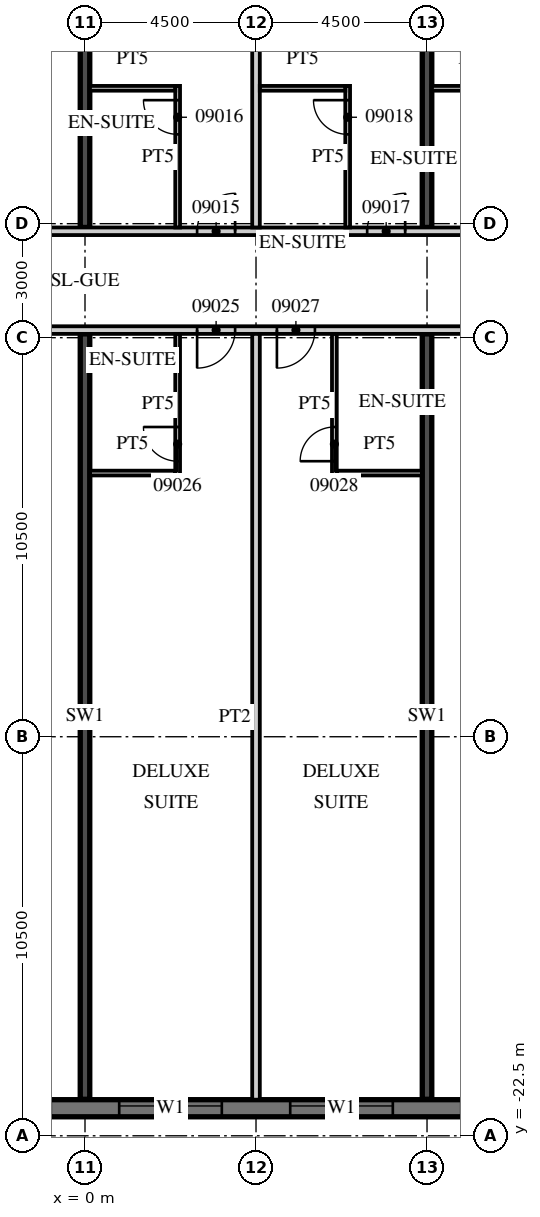
"""IFC4 building model, lengths in metres.
Left out: names, types, materials, properties, quantities, classifications, styles, units other than length and angle.
Written with IfcOpenShell. Run it as: python <this file> out.ifc"""

import sys

from ifc_helpers import new_model, si_unit, direction, frame, frame_2d, origin, place, context, subcontext, project, spatial, rectangle, extrude, element, fill, save


model = new_model("IFC4")
c1 = context("Model", 3, precision=1e-05, world=origin(), true_north=direction((0.0, 1.0)))
c2 = subcontext(c1, "Body", "Model", "MODEL_VIEW")
j1 = project(units=[si_unit("LENGTHUNIT", "METRE"), si_unit("PLANEANGLEUNIT", "RADIAN")], contexts=[c1])
p1 = place(None, origin())
s1 = spatial("IfcSite", under=j1, at=p1, CompositionType="ELEMENT")
p2 = place(p1, origin())
s2 = spatial("IfcBuilding", under=s1, at=p2, CompositionType="ELEMENT")
p3 = place(p2, frame((0.0, 0.0, 60.0)))
s3 = spatial("IfcBuildingStorey", under=s2, at=p3, CompositionType="ELEMENT", Elevation=60.0)
for number, where, z_axis, x_axis in (
    (1, (0.0, -21.54, 0.0), (0.0, 0.0, 1.0), (0.0, 1.0, 0.0)),
    (2, (0.0, 1.4, 0.0), (0.0, 0.0, 1.0), (0.0, 1.0, 0.0)),
    (3, (9.0, -21.54, 0.0), (0.0, 0.0, 1.0), (0.0, 1.0, 0.0)),
    (4, (9.0, 1.4, 0.0), (0.0, 0.0, 1.0), (0.0, 1.0, 0.0)),
):
    element("IfcWall", number, at=place(p3, frame(where, z_axis=z_axis, x_axis=x_axis)), inside=s3, PredefinedType="SHEAR", context=c2, shape_type="SweptSolid", body=[
        extrude(rectangle(XDim=20.14, YDim=0.25, at=frame_2d((10.07, 0.0))), origin(), (0.0, 0.0, 1.0), 3.3),
    ])
p4 = place(p3, frame((-13.5, -21.775, 0.0), z_axis=(0.0, 0.0, 1.0), x_axis=(1.0, 0.0, 0.0)))
e5 = element("IfcWall", 5, at=p4, inside=s3, PredefinedType="SOLIDWALL", context=c2, shape_type="SweptSolid", body=[
    extrude(rectangle(XDim=54.5, YDim=0.45, at=frame_2d((27.25, 0.0))), origin(), (0.0, 0.0, 1.0), 3.02),
])
p5 = place(p4, frame((0.9, 0.0, 0.45)))
e6 = element("IfcOpeningElement", 6, at=p5, cuts=e5, PredefinedType="OPENING", context=c2, shape_type="SweptSolid", body=[
    extrude(rectangle(XDim=2.7, YDim=2.25, at=frame_2d((1.35, 1.125))), frame((0.0, 0.235, 0.0), z_axis=(0.0, -1.0, 0.0), x_axis=(1.0, 0.0, 0.0)), (0.0, 0.0, 1.0), 0.47),
])
p6 = place(p4, frame((5.4, 0.0, 0.45)))
e7 = element("IfcOpeningElement", 7, at=p6, cuts=e5, PredefinedType="OPENING", context=c2, shape_type="SweptSolid", body=[
    extrude(rectangle(XDim=2.7, YDim=2.25, at=frame_2d((1.35, 1.125))), frame((0.0, 0.235, 0.0), z_axis=(0.0, -1.0, 0.0), x_axis=(1.0, 0.0, 0.0)), (0.0, 0.0, 1.0), 0.47),
])
p7 = place(p4, frame((9.9, 0.0, 0.45)))
e8 = element("IfcOpeningElement", 8, at=p7, cuts=e5, PredefinedType="OPENING", context=c2, shape_type="SweptSolid", body=[
    extrude(rectangle(XDim=2.7, YDim=2.25, at=frame_2d((1.35, 1.125))), frame((0.0, 0.235, 0.0), z_axis=(0.0, -1.0, 0.0), x_axis=(1.0, 0.0, 0.0)), (0.0, 0.0, 1.0), 0.47),
])
p8 = place(p4, frame((14.4, 0.0, 0.45)))
e9 = element("IfcOpeningElement", 9, at=p8, cuts=e5, PredefinedType="OPENING", context=c2, shape_type="SweptSolid", body=[
    extrude(rectangle(XDim=2.7, YDim=2.25, at=frame_2d((1.35, 1.125))), frame((0.0, 0.235, 0.0), z_axis=(0.0, -1.0, 0.0), x_axis=(1.0, 0.0, 0.0)), (0.0, 0.0, 1.0), 0.47),
])
p9 = place(p4, frame((18.9, 0.0, 0.45)))
e10 = element("IfcOpeningElement", 10, at=p9, cuts=e5, PredefinedType="OPENING", context=c2, shape_type="SweptSolid", body=[
    extrude(rectangle(XDim=2.7, YDim=2.25, at=frame_2d((1.35, 1.125))), frame((0.0, 0.235, 0.0), z_axis=(0.0, -1.0, 0.0), x_axis=(1.0, 0.0, 0.0)), (0.0, 0.0, 1.0), 0.47),
])
p10 = place(p4, frame((23.4, 0.0, 0.45)))
e11 = element("IfcOpeningElement", 11, at=p10, cuts=e5, PredefinedType="OPENING", context=c2, shape_type="SweptSolid", body=[
    extrude(rectangle(XDim=2.7, YDim=2.25, at=frame_2d((1.35, 1.125))), frame((0.0, 0.235, 0.0), z_axis=(0.0, -1.0, 0.0), x_axis=(1.0, 0.0, 0.0)), (0.0, 0.0, 1.0), 0.47),
])
p11 = place(p4, frame((27.9, 0.0, 0.45)))
e12 = element("IfcOpeningElement", 12, at=p11, cuts=e5, PredefinedType="OPENING", context=c2, shape_type="SweptSolid", body=[
    extrude(rectangle(XDim=2.7, YDim=2.25, at=frame_2d((1.35, 1.125))), frame((0.0, 0.235, 0.0), z_axis=(0.0, -1.0, 0.0), x_axis=(1.0, 0.0, 0.0)), (0.0, 0.0, 1.0), 0.47),
])
p12 = place(p4, frame((32.4, 0.0, 0.45)))
e13 = element("IfcOpeningElement", 13, at=p12, cuts=e5, PredefinedType="OPENING", context=c2, shape_type="SweptSolid", body=[
    extrude(rectangle(XDim=2.7, YDim=2.25, at=frame_2d((1.35, 1.125))), frame((0.0, 0.235, 0.0), z_axis=(0.0, -1.0, 0.0), x_axis=(1.0, 0.0, 0.0)), (0.0, 0.0, 1.0), 0.47),
])
p13 = place(p4, frame((36.9, 0.0, 0.45)))
e14 = element("IfcOpeningElement", 14, at=p13, cuts=e5, PredefinedType="OPENING", context=c2, shape_type="SweptSolid", body=[
    extrude(rectangle(XDim=2.7, YDim=2.25, at=frame_2d((1.35, 1.125))), frame((0.0, 0.235, 0.0), z_axis=(0.0, -1.0, 0.0), x_axis=(1.0, 0.0, 0.0)), (0.0, 0.0, 1.0), 0.47),
])
p14 = place(p4, frame((41.4, 0.0, 0.45)))
e15 = element("IfcOpeningElement", 15, at=p14, cuts=e5, PredefinedType="OPENING", context=c2, shape_type="SweptSolid", body=[
    extrude(rectangle(XDim=2.7, YDim=2.25, at=frame_2d((1.35, 1.125))), frame((0.0, 0.235, 0.0), z_axis=(0.0, -1.0, 0.0), x_axis=(1.0, 0.0, 0.0)), (0.0, 0.0, 1.0), 0.47),
])
p15 = place(p4, frame((45.9, 0.0, 0.45)))
e16 = element("IfcOpeningElement", 16, at=p15, cuts=e5, PredefinedType="OPENING", context=c2, shape_type="SweptSolid", body=[
    extrude(rectangle(XDim=2.7, YDim=2.25, at=frame_2d((1.35, 1.125))), frame((0.0, 0.235, 0.0), z_axis=(0.0, -1.0, 0.0), x_axis=(1.0, 0.0, 0.0)), (0.0, 0.0, 1.0), 0.47),
])
p16 = place(p4, frame((50.4, 0.0, 0.45)))
e17 = element("IfcOpeningElement", 17, at=p16, cuts=e5, PredefinedType="OPENING", context=c2, shape_type="SweptSolid", body=[
    extrude(rectangle(XDim=2.7, YDim=2.25, at=frame_2d((1.35, 1.125))), frame((0.0, 0.235, 0.0), z_axis=(0.0, -1.0, 0.0), x_axis=(1.0, 0.0, 0.0)), (0.0, 0.0, 1.0), 0.47),
])
p17 = place(p3, frame((-44.55, 1.3, 0.0), z_axis=(0.0, 0.0, 1.0), x_axis=(1.0, 0.0, 0.0)))
e18 = element("IfcWall", 18, at=p17, inside=s3, PredefinedType="PARTITIONING", context=c2, shape_type="SweptSolid", body=[
    extrude(rectangle(XDim=58.05, YDim=0.2, at=frame_2d((29.025, 0.0))), origin(), (0.0, 0.0, 1.0), 3.02),
])
p18 = place(p17, frame((0.525, 0.0, 0.0)))
e19 = element("IfcOpeningElement", 19, at=p18, cuts=e18, PredefinedType="OPENING", context=c2, shape_type="SweptSolid", body=[
    extrude(rectangle(XDim=1.0, YDim=2.1, at=frame_2d((0.5, 1.05))), frame((0.0, 0.11, 0.0), z_axis=(0.0, -1.0, 0.0), x_axis=(1.0, 0.0, 0.0)), (0.0, 0.0, 1.0), 0.22),
])
p19 = place(p17, frame((6.975, 0.0, 0.0)))
e20 = element("IfcOpeningElement", 20, at=p19, cuts=e18, PredefinedType="OPENING", context=c2, shape_type="SweptSolid", body=[
    extrude(rectangle(XDim=1.0, YDim=2.1, at=frame_2d((0.5, 1.05))), frame((0.0, 0.11, 0.0), z_axis=(0.0, -1.0, 0.0), x_axis=(1.0, 0.0, 0.0)), (0.0, 0.0, 1.0), 0.22),
])
p20 = place(p17, frame((10.987, 0.0, 0.0)))
e21 = element("IfcOpeningElement", 21, at=p20, cuts=e18, PredefinedType="OPENING", context=c2, shape_type="SweptSolid", body=[
    extrude(rectangle(XDim=1.2, YDim=2.1, at=frame_2d((0.6, 1.05))), frame((0.0, 0.11, 0.0), z_axis=(0.0, -1.0, 0.0), x_axis=(1.0, 0.0, 0.0)), (0.0, 0.0, 1.0), 0.22),
])
p21 = place(p17, frame((19.987, 0.0, 0.0)))
e22 = element("IfcOpeningElement", 22, at=p21, cuts=e18, PredefinedType="OPENING", context=c2, shape_type="SweptSolid", body=[
    extrude(rectangle(XDim=1.2, YDim=2.1, at=frame_2d((0.6, 1.05))), frame((0.0, 0.11, 0.0), z_axis=(0.0, -1.0, 0.0), x_axis=(1.0, 0.0, 0.0)), (0.0, 0.0, 1.0), 0.22),
])
p22 = place(p17, frame((29.5, 0.0, 0.0)))
e23 = element("IfcOpeningElement", 23, at=p22, cuts=e18, PredefinedType="OPENING", context=c2, shape_type="SweptSolid", body=[
    extrude(rectangle(XDim=1.0, YDim=2.1, at=frame_2d((0.5, 1.05))), frame((0.0, 0.11, 0.0), z_axis=(0.0, -1.0, 0.0), x_axis=(1.0, 0.0, 0.0)), (0.0, 0.0, 1.0), 0.22),
])
p23 = place(p17, frame((33.975, 0.0, 0.0)))
e24 = element("IfcOpeningElement", 24, at=p23, cuts=e18, PredefinedType="OPENING", context=c2, shape_type="SweptSolid", body=[
    extrude(rectangle(XDim=1.0, YDim=2.1, at=frame_2d((0.5, 1.05))), frame((0.0, 0.11, 0.0), z_axis=(0.0, -1.0, 0.0), x_axis=(1.0, 0.0, 0.0)), (0.0, 0.0, 1.0), 0.22),
])
p24 = place(p17, frame((40.912, 0.0, 0.0)))
e25 = element("IfcOpeningElement", 25, at=p24, cuts=e18, PredefinedType="OPENING", context=c2, shape_type="SweptSolid", body=[
    extrude(rectangle(XDim=1.2, YDim=2.1, at=frame_2d((0.6, 1.05))), frame((0.0, 0.11, 0.0), z_axis=(0.0, -1.0, 0.0), x_axis=(1.0, 0.0, 0.0)), (0.0, 0.0, 1.0), 0.22),
])
p25 = place(p17, frame((47.5, 0.0, 0.0)))
e26 = element("IfcOpeningElement", 26, at=p25, cuts=e18, PredefinedType="OPENING", context=c2, shape_type="SweptSolid", body=[
    extrude(rectangle(XDim=1.0, YDim=2.1, at=frame_2d((0.5, 1.05))), frame((0.0, 0.11, 0.0), z_axis=(0.0, -1.0, 0.0), x_axis=(1.0, 0.0, 0.0)), (0.0, 0.0, 1.0), 0.22),
])
p26 = place(p17, frame((51.975, 0.0, 0.0)))
e27 = element("IfcOpeningElement", 27, at=p26, cuts=e18, PredefinedType="OPENING", context=c2, shape_type="SweptSolid", body=[
    extrude(rectangle(XDim=1.0, YDim=2.1, at=frame_2d((0.5, 1.05))), frame((0.0, 0.11, 0.0), z_axis=(0.0, -1.0, 0.0), x_axis=(1.0, 0.0, 0.0)), (0.0, 0.0, 1.0), 0.22),
])
p27 = place(p17, frame((56.475, 0.0, 0.0)))
e28 = element("IfcOpeningElement", 28, at=p27, cuts=e18, PredefinedType="OPENING", context=c2, shape_type="SweptSolid", body=[
    extrude(rectangle(XDim=1.0, YDim=2.1, at=frame_2d((0.5, 1.05))), frame((0.0, 0.11, 0.0), z_axis=(0.0, -1.0, 0.0), x_axis=(1.0, 0.0, 0.0)), (0.0, 0.0, 1.0), 0.22),
])
p28 = place(p3, frame((4.5, 1.4, 0.0), z_axis=(0.0, 0.0, 1.0), x_axis=(0.0, 1.0, 0.0)))
e29 = element("IfcWall", 29, at=p28, inside=s3, PredefinedType="PARTITIONING", context=c2, shape_type="SweptSolid", body=[
    extrude(rectangle(XDim=20.15, YDim=0.2, at=frame_2d((10.075, 0.0))), origin(), (0.0, 0.0, 1.0), 3.02),
])
p29 = place(p3, frame((2.438, 1.4, 0.0), z_axis=(0.0, 0.0, 1.0), x_axis=(0.0, 1.0, 0.0)))
e30 = element("IfcWall", 30, at=p29, inside=s3, PredefinedType="PARTITIONING", context=c2, shape_type="SweptSolid", body=[
    extrude(rectangle(XDim=3.725, YDim=0.125, at=frame_2d((1.863, 0.0))), origin(), (0.0, 0.0, 1.0), 3.02),
])
p30 = place(p29, frame((2.45, 0.0, 0.0)))
e31 = element("IfcOpeningElement", 31, at=p30, cuts=e30, PredefinedType="OPENING", context=c2, shape_type="SweptSolid", body=[
    extrude(rectangle(XDim=0.9, YDim=2.1, at=frame_2d((0.45, 1.05))), frame((0.0, 0.073, 0.0), z_axis=(0.0, -1.0, 0.0), x_axis=(1.0, 0.0, 0.0)), (0.0, 0.0, 1.0), 0.145),
])
p31 = place(p3, frame((0.125, 5.062, 0.0), z_axis=(0.0, 0.0, 1.0), x_axis=(1.0, 0.0, 0.0)))
e32 = element("IfcWall", 32, at=p31, inside=s3, PredefinedType="PARTITIONING", context=c2, shape_type="SweptSolid", body=[
    extrude(rectangle(XDim=2.25, YDim=0.125, at=frame_2d((1.125, 0.0))), origin(), (0.0, 0.0, 1.0), 3.02),
])
p32 = place(p3, frame((6.912, 1.4, 0.0), z_axis=(0.0, 0.0, 1.0), x_axis=(0.0, 1.0, 0.0)))
e33 = element("IfcWall", 33, at=p32, inside=s3, PredefinedType="PARTITIONING", context=c2, shape_type="SweptSolid", body=[
    extrude(rectangle(XDim=3.725, YDim=0.125, at=frame_2d((1.863, 0.0))), origin(), (0.0, 0.0, 1.0), 3.02),
])
p33 = place(p32, frame((2.45, 0.0, 0.0)))
e34 = element("IfcOpeningElement", 34, at=p33, cuts=e33, PredefinedType="OPENING", context=c2, shape_type="SweptSolid", body=[
    extrude(rectangle(XDim=0.9, YDim=2.1, at=frame_2d((0.45, 1.05))), frame((0.0, 0.073, 0.0), z_axis=(0.0, -1.0, 0.0), x_axis=(1.0, 0.0, 0.0)), (0.0, 0.0, 1.0), 0.145),
])
for number, where, z_axis, x_axis in (
    (35, (4.6, 5.062, 0.0), (0.0, 0.0, 1.0), (1.0, 0.0, 0.0)),
    (36, (9.125, 5.062, 0.0), (0.0, 0.0, 1.0), (1.0, 0.0, 0.0)),
):
    element("IfcWall", number, at=place(p3, frame(where, z_axis=z_axis, x_axis=x_axis)), inside=s3, PredefinedType="PARTITIONING", context=c2, shape_type="SweptSolid", body=[
        extrude(rectangle(XDim=2.25, YDim=0.125, at=frame_2d((1.125, 0.0))), origin(), (0.0, 0.0, 1.0), 3.02),
    ])
p34 = place(p3, frame((-13.5, -1.3, 0.0), z_axis=(0.0, 0.0, 1.0), x_axis=(1.0, 0.0, 0.0)))
e37 = element("IfcWall", 37, at=p34, inside=s3, PredefinedType="PARTITIONING", context=c2, shape_type="SweptSolid", body=[
    extrude(rectangle(XDim=58.05, YDim=0.2, at=frame_2d((29.025, 0.0))), origin(), (0.0, 0.0, 1.0), 3.02),
])
p35 = place(p34, frame((2.925, 0.0, 0.0)))
e38 = element("IfcOpeningElement", 38, at=p35, cuts=e37, PredefinedType="OPENING", context=c2, shape_type="SweptSolid", body=[
    extrude(rectangle(XDim=1.0, YDim=2.1, at=frame_2d((0.5, 1.05))), frame((0.0, 0.11, 0.0), z_axis=(0.0, -1.0, 0.0), x_axis=(1.0, 0.0, 0.0)), (0.0, 0.0, 1.0), 0.22),
])
p36 = place(p34, frame((9.863, 0.0, 0.0)))
e39 = element("IfcOpeningElement", 39, at=p36, cuts=e37, PredefinedType="OPENING", context=c2, shape_type="SweptSolid", body=[
    extrude(rectangle(XDim=1.2, YDim=2.1, at=frame_2d((0.6, 1.05))), frame((0.0, 0.11, 0.0), z_axis=(0.0, -1.0, 0.0), x_axis=(1.0, 0.0, 0.0)), (0.0, 0.0, 1.0), 0.22),
])
p37 = place(p34, frame((16.45, 0.0, 0.0)))
e40 = element("IfcOpeningElement", 40, at=p37, cuts=e37, PredefinedType="OPENING", context=c2, shape_type="SweptSolid", body=[
    extrude(rectangle(XDim=1.0, YDim=2.1, at=frame_2d((0.5, 1.05))), frame((0.0, 0.11, 0.0), z_axis=(0.0, -1.0, 0.0), x_axis=(1.0, 0.0, 0.0)), (0.0, 0.0, 1.0), 0.22),
])
p38 = place(p34, frame((18.55, 0.0, 0.0)))
e41 = element("IfcOpeningElement", 41, at=p38, cuts=e37, PredefinedType="OPENING", context=c2, shape_type="SweptSolid", body=[
    extrude(rectangle(XDim=1.0, YDim=2.1, at=frame_2d((0.5, 1.05))), frame((0.0, 0.11, 0.0), z_axis=(0.0, -1.0, 0.0), x_axis=(1.0, 0.0, 0.0)), (0.0, 0.0, 1.0), 0.22),
])
p39 = place(p34, frame((24.938, 0.0, 0.0)))
e42 = element("IfcOpeningElement", 42, at=p39, cuts=e37, PredefinedType="OPENING", context=c2, shape_type="SweptSolid", body=[
    extrude(rectangle(XDim=1.2, YDim=2.1, at=frame_2d((0.6, 1.05))), frame((0.0, 0.11, 0.0), z_axis=(0.0, -1.0, 0.0), x_axis=(1.0, 0.0, 0.0)), (0.0, 0.0, 1.0), 0.22),
])
p40 = place(p34, frame((33.938, 0.0, 0.0)))
e43 = element("IfcOpeningElement", 43, at=p40, cuts=e37, PredefinedType="OPENING", context=c2, shape_type="SweptSolid", body=[
    extrude(rectangle(XDim=1.2, YDim=2.1, at=frame_2d((0.6, 1.05))), frame((0.0, 0.11, 0.0), z_axis=(0.0, -1.0, 0.0), x_axis=(1.0, 0.0, 0.0)), (0.0, 0.0, 1.0), 0.22),
])
p41 = place(p34, frame((42.938, 0.0, 0.0)))
e44 = element("IfcOpeningElement", 44, at=p41, cuts=e37, PredefinedType="OPENING", context=c2, shape_type="SweptSolid", body=[
    extrude(rectangle(XDim=1.2, YDim=2.1, at=frame_2d((0.6, 1.05))), frame((0.0, 0.11, 0.0), z_axis=(0.0, -1.0, 0.0), x_axis=(1.0, 0.0, 0.0)), (0.0, 0.0, 1.0), 0.22),
])
p42 = place(p34, frame((52.425, 0.0, 0.0)))
e45 = element("IfcOpeningElement", 45, at=p42, cuts=e37, PredefinedType="OPENING", context=c2, shape_type="SweptSolid", body=[
    extrude(rectangle(XDim=1.0, YDim=2.1, at=frame_2d((0.5, 1.05))), frame((0.0, 0.11, 0.0), z_axis=(0.0, -1.0, 0.0), x_axis=(1.0, 0.0, 0.0)), (0.0, 0.0, 1.0), 0.22),
])
p43 = place(p34, frame((56.525, 0.0, 0.0)))
e46 = element("IfcOpeningElement", 46, at=p43, cuts=e37, PredefinedType="OPENING", context=c2, shape_type="SweptSolid", body=[
    extrude(rectangle(XDim=1.0, YDim=2.1, at=frame_2d((0.5, 1.05))), frame((0.0, 0.11, 0.0), z_axis=(0.0, -1.0, 0.0), x_axis=(1.0, 0.0, 0.0)), (0.0, 0.0, 1.0), 0.22),
])
p44 = place(p3, frame((4.5, -21.55, 0.0), z_axis=(0.0, 0.0, 1.0), x_axis=(0.0, 1.0, 0.0)))
e47 = element("IfcWall", 47, at=p44, inside=s3, PredefinedType="PARTITIONING", context=c2, shape_type="SweptSolid", body=[
    extrude(rectangle(XDim=20.15, YDim=0.2, at=frame_2d((10.075, 0.0))), origin(), (0.0, 0.0, 1.0), 3.02),
])
p45 = place(p3, frame((2.438, -5.125, 0.0), z_axis=(0.0, 0.0, 1.0), x_axis=(0.0, 1.0, 0.0)))
e48 = element("IfcWall", 48, at=p45, inside=s3, PredefinedType="PARTITIONING", context=c2, shape_type="SweptSolid", body=[
    extrude(rectangle(XDim=3.725, YDim=0.125, at=frame_2d((1.863, 0.0))), origin(), (0.0, 0.0, 1.0), 3.02),
])
p46 = place(p45, frame((0.375, 0.0, 0.0)))
e49 = element("IfcOpeningElement", 49, at=p46, cuts=e48, PredefinedType="OPENING", context=c2, shape_type="SweptSolid", body=[
    extrude(rectangle(XDim=0.9, YDim=2.1, at=frame_2d((0.45, 1.05))), frame((0.0, 0.073, 0.0), z_axis=(0.0, -1.0, 0.0), x_axis=(1.0, 0.0, 0.0)), (0.0, 0.0, 1.0), 0.145),
])
p47 = place(p3, frame((0.125, -5.062, 0.0), z_axis=(0.0, 0.0, 1.0), x_axis=(1.0, 0.0, 0.0)))
e50 = element("IfcWall", 50, at=p47, inside=s3, PredefinedType="PARTITIONING", context=c2, shape_type="SweptSolid", body=[
    extrude(rectangle(XDim=2.25, YDim=0.125, at=frame_2d((1.125, 0.0))), origin(), (0.0, 0.0, 1.0), 3.02),
])
p48 = place(p3, frame((6.562, -5.125, 0.0), z_axis=(0.0, 0.0, 1.0), x_axis=(0.0, 1.0, 0.0)))
e51 = element("IfcWall", 51, at=p48, inside=s3, PredefinedType="PARTITIONING", context=c2, shape_type="SweptSolid", body=[
    extrude(rectangle(XDim=3.725, YDim=0.125, at=frame_2d((1.863, 0.0))), origin(), (0.0, 0.0, 1.0), 3.02),
])
p49 = place(p48, frame((0.375, 0.0, 0.0)))
e52 = element("IfcOpeningElement", 52, at=p49, cuts=e51, PredefinedType="OPENING", context=c2, shape_type="SweptSolid", body=[
    extrude(rectangle(XDim=0.9, YDim=2.1, at=frame_2d((0.45, 1.05))), frame((0.0, 0.073, 0.0), z_axis=(0.0, -1.0, 0.0), x_axis=(1.0, 0.0, 0.0)), (0.0, 0.0, 1.0), 0.145),
])
p50 = place(p3, frame((6.625, -5.062, 0.0), z_axis=(0.0, 0.0, 1.0), x_axis=(1.0, 0.0, 0.0)))
e53 = element("IfcWall", 53, at=p50, inside=s3, PredefinedType="PARTITIONING", context=c2, shape_type="SweptSolid", body=[
    extrude(rectangle(XDim=2.25, YDim=0.125, at=frame_2d((1.125, 0.0))), origin(), (0.0, 0.0, 1.0), 3.02),
])
p51 = place(p8, origin())
e54 = element("IfcWindow", 54, at=p51, inside=s3, PartitioningType="SINGLE_PANEL", PredefinedType="WINDOW", context=c2, shape_type="SweptSolid", body=[
    extrude(rectangle(XDim=2.7, YDim=2.25, at=frame_2d((1.35, 1.125))), frame((0.0, 0.09, 0.0), z_axis=(0.0, -1.0, 0.0), x_axis=(1.0, 0.0, 0.0)), (0.0, 0.0, 1.0), 0.06),
])
fill(e9, e54)
p52 = place(p9, origin())
e55 = element("IfcWindow", 55, at=p52, inside=s3, PartitioningType="SINGLE_PANEL", PredefinedType="WINDOW", context=c2, shape_type="SweptSolid", body=[
    extrude(rectangle(XDim=2.7, YDim=2.25, at=frame_2d((1.35, 1.125))), frame((0.0, 0.09, 0.0), z_axis=(0.0, -1.0, 0.0), x_axis=(1.0, 0.0, 0.0)), (0.0, 0.0, 1.0), 0.06),
])
fill(e10, e55)
p53 = place(p25, origin())
e56 = element("IfcDoor", 56, at=p53, inside=s3, OperationType="SINGLE_SWING_RIGHT", PredefinedType="DOOR", context=c2, shape_type="SweptSolid", body=[
    extrude(rectangle(XDim=1.0, YDim=2.1, at=frame_2d((0.5, 1.05))), frame((0.0, 0.025, 0.0), z_axis=(0.0, -1.0, 0.0), x_axis=(1.0, 0.0, 0.0)), (0.0, 0.0, 1.0), 0.05),
])
fill(e26, e56)
p54 = place(p30, origin())
e57 = element("IfcDoor", 57, at=p54, inside=s3, OperationType="SINGLE_SWING_RIGHT", PredefinedType="DOOR", context=c2, shape_type="SweptSolid", body=[
    extrude(rectangle(XDim=0.9, YDim=2.1, at=frame_2d((0.45, 1.05))), frame((0.0, 0.025, 0.0), z_axis=(0.0, -1.0, 0.0), x_axis=(1.0, 0.0, 0.0)), (0.0, 0.0, 1.0), 0.05),
])
fill(e31, e57)
p55 = place(p26, origin())
e58 = element("IfcDoor", 58, at=p55, inside=s3, OperationType="SINGLE_SWING_RIGHT", PredefinedType="DOOR", context=c2, shape_type="SweptSolid", body=[
    extrude(rectangle(XDim=1.0, YDim=2.1, at=frame_2d((0.5, 1.05))), frame((0.0, 0.025, 0.0), z_axis=(0.0, -1.0, 0.0), x_axis=(1.0, 0.0, 0.0)), (0.0, 0.0, 1.0), 0.05),
])
fill(e27, e58)
p56 = place(p33, origin())
e59 = element("IfcDoor", 59, at=p56, inside=s3, OperationType="SINGLE_SWING_RIGHT", PredefinedType="DOOR", context=c2, shape_type="SweptSolid", body=[
    extrude(rectangle(XDim=0.9, YDim=2.1, at=frame_2d((0.45, 1.05))), frame((0.0, 0.025, 0.0), z_axis=(0.0, -1.0, 0.0), x_axis=(1.0, 0.0, 0.0)), (0.0, 0.0, 1.0), 0.05),
])
fill(e34, e59)
p57 = place(p37, origin())
e60 = element("IfcDoor", 60, at=p57, inside=s3, OperationType="SINGLE_SWING_LEFT", PredefinedType="DOOR", context=c2, shape_type="SweptSolid", body=[
    extrude(rectangle(XDim=1.0, YDim=2.1, at=frame_2d((0.5, 1.05))), frame((0.0, 0.025, 0.0), z_axis=(0.0, -1.0, 0.0), x_axis=(1.0, 0.0, 0.0)), (0.0, 0.0, 1.0), 0.05),
])
fill(e40, e60)
p58 = place(p46, origin())
e61 = element("IfcDoor", 61, at=p58, inside=s3, OperationType="SINGLE_SWING_RIGHT", PredefinedType="DOOR", context=c2, shape_type="SweptSolid", body=[
    extrude(rectangle(XDim=0.9, YDim=2.1, at=frame_2d((0.45, 1.05))), frame((0.0, 0.025, 0.0), z_axis=(0.0, -1.0, 0.0), x_axis=(1.0, 0.0, 0.0)), (0.0, 0.0, 1.0), 0.05),
])
fill(e49, e61)
p59 = place(p38, origin())
e62 = element("IfcDoor", 62, at=p59, inside=s3, OperationType="SINGLE_SWING_LEFT", PredefinedType="DOOR", context=c2, shape_type="SweptSolid", body=[
    extrude(rectangle(XDim=1.0, YDim=2.1, at=frame_2d((0.5, 1.05))), frame((0.0, 0.025, 0.0), z_axis=(0.0, -1.0, 0.0), x_axis=(1.0, 0.0, 0.0)), (0.0, 0.0, 1.0), 0.05),
])
fill(e41, e62)
p60 = place(p49, origin())
e63 = element("IfcDoor", 63, at=p60, inside=s3, OperationType="SINGLE_SWING_LEFT", PredefinedType="DOOR", context=c2, shape_type="SweptSolid", body=[
    extrude(rectangle(XDim=0.9, YDim=2.1, at=frame_2d((0.45, 1.05))), frame((0.0, 0.025, 0.0), z_axis=(0.0, -1.0, 0.0), x_axis=(1.0, 0.0, 0.0)), (0.0, 0.0, 1.0), 0.05),
])
fill(e52, e63)
save(model, sys.argv[1])
